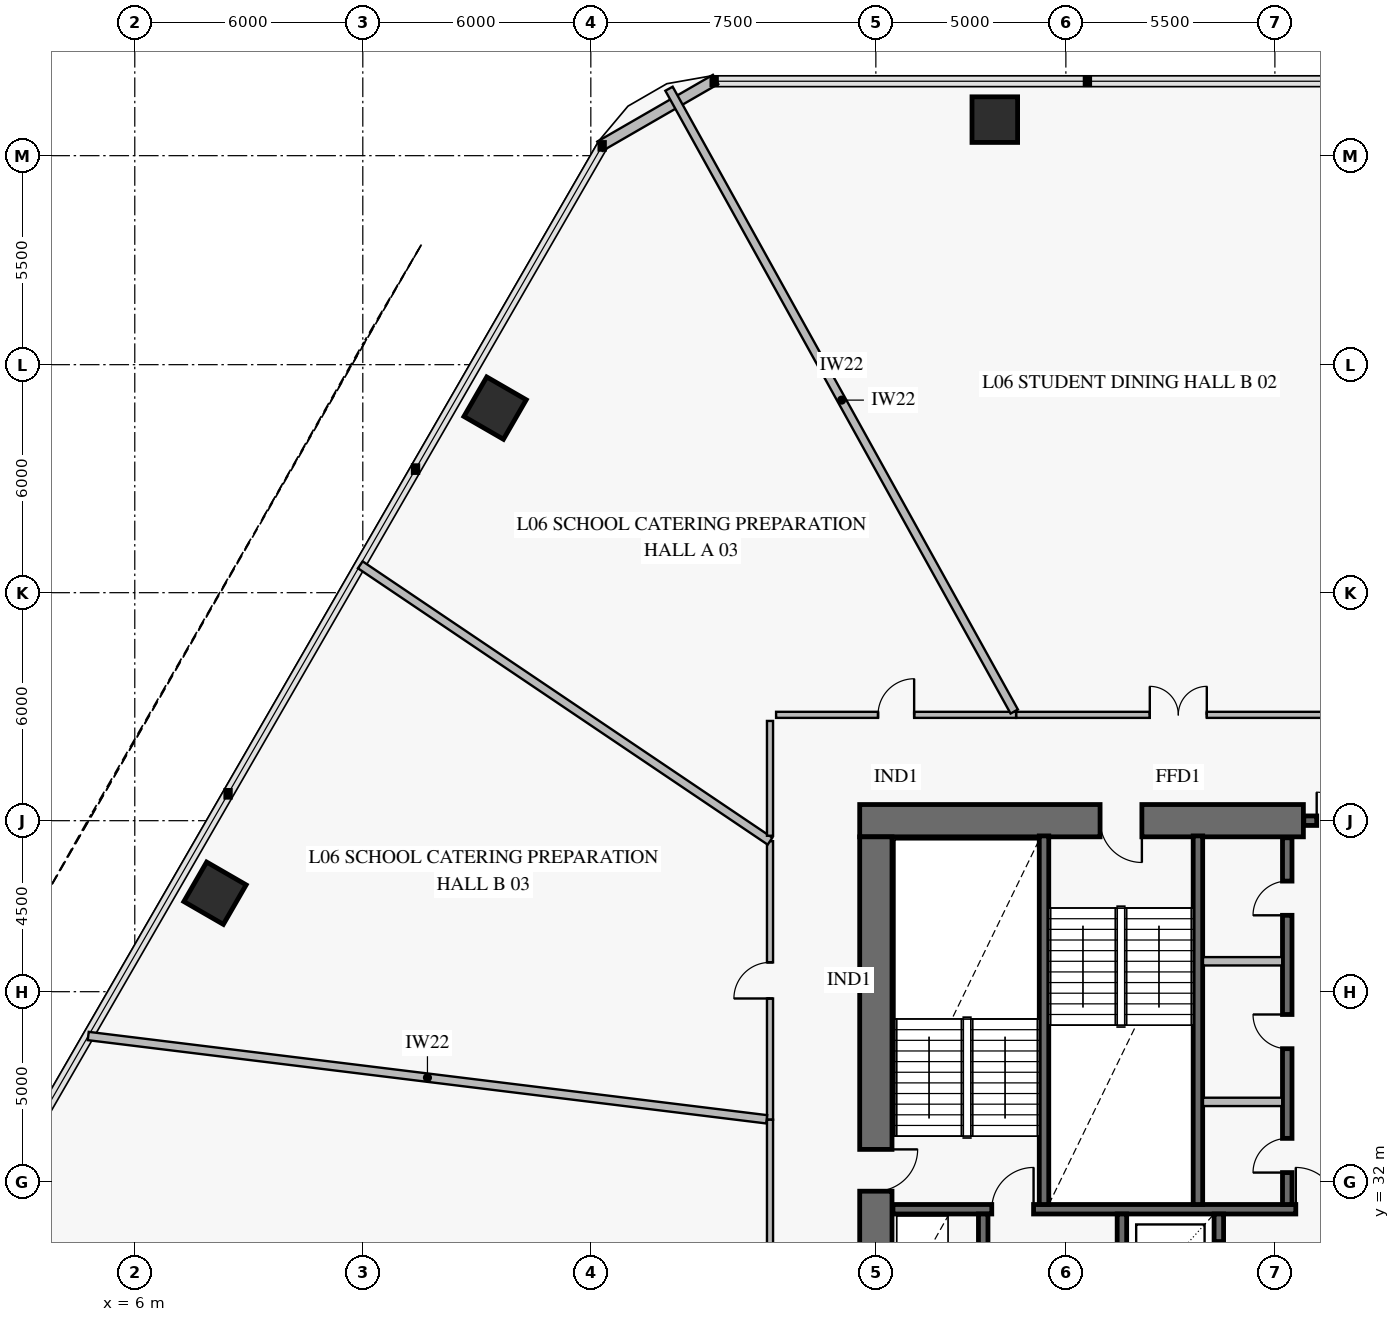
"""IFC4 building model, lengths in metres.
Left out: names, types, materials, properties, quantities, classifications, styles, units other than length and angle.
Written with IfcOpenShell. Run it as: python <this file> out.ifc"""

import sys

from ifc_helpers import new_model, si_unit, direction, frame, frame_2d, origin, origin_2d, place, context, subcontext, project, spatial, rectangle, extrude, element, fill, save


model = new_model("IFC4")
c1 = context("Model", 3, precision=1e-05, world=origin(), true_north=direction((0.0, 1.0)))
c2 = subcontext(c1, "Body", "Model", "MODEL_VIEW")
j1 = project(units=[si_unit("LENGTHUNIT", "METRE"), si_unit("PLANEANGLEUNIT", "RADIAN")], contexts=[c1])
p1 = place(None, origin())
s1 = spatial("IfcSite", under=j1, at=p1, CompositionType="ELEMENT")
p2 = place(p1, origin())
s2 = spatial("IfcBuilding", under=s1, at=p2, CompositionType="ELEMENT")
p3 = place(p2, frame((0.0, 0.0, 24.6)))
s3 = spatial("IfcBuildingStorey", under=s2, at=p3, CompositionType="ELEMENT", Elevation=24.6)
p4 = place(p3, frame((36.75, 41.5, 0.0), z_axis=(0.0, 0.0, 1.0), x_axis=(-1.0, 0.0, 0.0)))
e1 = element("IfcWall", 1, at=p4, inside=s3, PredefinedType="SHEAR", context=c2, shape_type="SweptSolid", body=[
    extrude(rectangle(XDim=11.675, YDim=0.85, at=frame_2d((5.837, 0.0))), origin(), (0.0, 0.0, 1.0), 4.2),
])
p5 = place(p4, frame((4.25, 0.0, 0.0)))
e2 = element("IfcOpeningElement", 2, at=p5, cuts=e1, PredefinedType="OPENING", context=c2, shape_type="SweptSolid", body=[
    extrude(rectangle(XDim=1.1, YDim=2.15, at=frame_2d((0.55, 1.075))), frame((0.0, 0.437, 0.0), z_axis=(0.0, -1.0, 0.0), x_axis=(1.0, 0.0, 0.0)), (0.0, 0.0, 1.0), 0.874),
])
p6 = place(p3, frame((25.5, 22.925, 0.0), z_axis=(0.0, 0.0, 1.0), x_axis=(0.0, 1.0, 0.0)))
e3 = element("IfcWall", 3, at=p6, inside=s3, PredefinedType="SHEAR", context=c2, shape_type="SweptSolid", body=[
    extrude(rectangle(XDim=18.15, YDim=0.85, at=frame_2d((9.075, 0.0))), origin(), (0.0, 0.0, 1.0), 4.2),
])
p7 = place(p6, frame((8.825, 0.0, 0.0)))
e4 = element("IfcOpeningElement", 4, at=p7, cuts=e3, PredefinedType="OPENING", context=c2, shape_type="SweptSolid", body=[
    extrude(rectangle(XDim=1.1, YDim=2.15, at=frame_2d((0.55, 1.075))), frame((0.0, 0.437, 0.0), z_axis=(0.0, -1.0, 0.0), x_axis=(1.0, 0.0, 0.0)), (0.0, 0.0, 1.0), 0.874),
])
for number, where, z_axis, x_axis in (
    (5, (28.63, 59.948, 0.0), (0.0, 0.0, 1.0), (-1.0, 0.0, 0.0)),
    (6, (15.481, 52.357, 0.0), (0.0, 0.0, 1.0), (-0.5, -0.866, 0.0)),
    (7, (8.111, 39.592, 0.0), (0.0, 0.0, 1.0), (-0.5, -0.866, 0.0)),
):
    element("IfcColumn", number, at=place(p3, frame(where, z_axis=z_axis, x_axis=x_axis)), inside=s3, PredefinedType="COLUMN", context=c2, shape_type="SweptSolid", body=[
        extrude(rectangle(XDim=1.2, YDim=1.2, at=origin_2d()), origin(), (0.0, 0.0, 1.0), 3.92),
    ])
p8 = place(p3, frame((18.239, 59.249, 0.0), z_axis=(0.0, 0.0, 1.0), x_axis=(0.866007452331, 0.500031091541, 0.0)))
e8 = element("IfcWall", 8, at=p8, inside=s3, PredefinedType="SOLIDWALL", context=c2, shape_type="SweptSolid", body=[
    extrude(rectangle(XDim=3.515, YDim=0.28, at=frame_2d((1.757, 0.0))), origin(), (0.0, 0.0, 1.0), 3.92),
])
p9 = place(p3, frame((36.76, 41.5, 0.0), z_axis=(0.0, 0.0, 1.0), x_axis=(1.0, 0.0, 0.0)))
e9 = element("IfcWall", 9, at=p9, inside=s3, PredefinedType="SOLIDWALL", context=c2, shape_type="SweptSolid", body=[
    extrude(rectangle(XDim=2.18, YDim=0.25, at=frame_2d((1.09, 0.0))), origin(), (0.0, 0.0, 1.0), 4.2),
])
p10 = place(p9, frame((0.34, 0.0, 0.0)))
e10 = element("IfcOpeningElement", 10, at=p10, cuts=e9, PredefinedType="OPENING", context=c2, shape_type="SweptSolid", body=[
    extrude(rectangle(XDim=1.5, YDim=2.15, at=frame_2d((0.75, 1.075))), frame((0.0, 0.137, 0.0), z_axis=(0.0, -1.0, 0.0), x_axis=(1.0, 0.0, 0.0)), (0.0, 0.0, 1.0), 0.274),
])
p11 = place(p3, frame((25.95, 31.275, 0.0), z_axis=(0.0, 0.0, 1.0), x_axis=(1.0, 0.0, 0.0)))
e11 = element("IfcWall", 11, at=p11, inside=s3, PredefinedType="SOLIDWALL", context=c2, shape_type="SweptSolid", body=[
    extrude(rectangle(XDim=20.1, YDim=0.25, at=frame_2d((10.05, 0.0))), origin(), (0.0, 0.0, 1.0), 4.2),
])
p12 = place(p11, frame((2.6, 0.0, 0.0)))
e12 = element("IfcOpeningElement", 12, at=p12, cuts=e11, PredefinedType="OPENING", context=c2, shape_type="SweptSolid", body=[
    extrude(rectangle(XDim=1.1, YDim=2.15, at=frame_2d((0.55, 1.075))), frame((0.0, 0.137, 0.0), z_axis=(0.0, -1.0, 0.0), x_axis=(1.0, 0.0, 0.0)), (0.0, 0.0, 1.0), 0.274),
])
p13 = place(p11, frame((10.6, 0.0, 0.0)))
e13 = element("IfcOpeningElement", 13, at=p13, cuts=e11, PredefinedType="OPENING", context=c2, shape_type="SweptSolid", body=[
    extrude(rectangle(XDim=1.1, YDim=2.15, at=frame_2d((0.55, 1.075))), frame((0.0, 0.137, 0.0), z_axis=(0.0, -1.0, 0.0), x_axis=(1.0, 0.0, 0.0)), (0.0, 0.0, 1.0), 0.274),
])
p14 = place(p11, frame((16.35, 0.0, 0.0)))
e14 = element("IfcOpeningElement", 14, at=p14, cuts=e11, PredefinedType="OPENING", context=c2, shape_type="SweptSolid", body=[
    extrude(rectangle(XDim=1.1, YDim=2.15, at=frame_2d((0.55, 1.075))), frame((0.0, 0.137, 0.0), z_axis=(0.0, -1.0, 0.0), x_axis=(1.0, 0.0, 0.0)), (0.0, 0.0, 1.0), 0.274),
])
for number, where, z_axis, x_axis in (
    (15, (29.925, 31.4, 0.0), (0.0, 0.0, 1.0), (0.0, 1.0, 0.0)),
    (16, (33.975, 31.4, 0.0), (0.0, 0.0, 1.0), (0.0, 1.0, 0.0)),
):
    element("IfcWall", number, at=place(p3, frame(where, z_axis=z_axis, x_axis=x_axis)), inside=s3, PredefinedType="SOLIDWALL", context=c2, shape_type="SweptSolid", body=[
        extrude(rectangle(XDim=9.7, YDim=0.25, at=frame_2d((4.85, 0.0))), origin(), (0.0, 0.0, 1.0), 4.2),
    ])
p15 = place(p3, frame((36.325, 31.4, 0.0), z_axis=(0.0, 0.0, 1.0), x_axis=(0.0, 1.0, 0.0)))
e17 = element("IfcWall", 17, at=p15, inside=s3, PredefinedType="SOLIDWALL", context=c2, shape_type="SweptSolid", body=[
    extrude(rectangle(XDim=9.65, YDim=0.25, at=frame_2d((4.825, 0.0))), origin(), (0.0, 0.0, 1.0), 4.2),
])
p16 = place(p15, frame((0.84, 0.0, 0.0)))
e18 = element("IfcOpeningElement", 18, at=p16, cuts=e17, PredefinedType="OPENING", context=c2, shape_type="SweptSolid", body=[
    extrude(rectangle(XDim=0.9, YDim=2.1, at=frame_2d((0.45, 1.05))), frame((0.0, 0.137, 0.0), z_axis=(0.0, -1.0, 0.0), x_axis=(1.0, 0.0, 0.0)), (0.0, 0.0, 1.0), 0.274),
])
p17 = place(p15, frame((4.1, 0.0, 0.0)))
e19 = element("IfcOpeningElement", 19, at=p17, cuts=e17, PredefinedType="OPENING", context=c2, shape_type="SweptSolid", body=[
    extrude(rectangle(XDim=0.9, YDim=2.1, at=frame_2d((0.45, 1.05))), frame((0.0, 0.137, 0.0), z_axis=(0.0, -1.0, 0.0), x_axis=(1.0, 0.0, 0.0)), (0.0, 0.0, 1.0), 0.274),
])
p18 = place(p15, frame((7.61, 0.0, 0.0)))
e20 = element("IfcOpeningElement", 20, at=p18, cuts=e17, PredefinedType="OPENING", context=c2, shape_type="SweptSolid", body=[
    extrude(rectangle(XDim=0.9, YDim=2.1, at=frame_2d((0.45, 1.05))), frame((0.0, 0.137, 0.0), z_axis=(0.0, -1.0, 0.0), x_axis=(1.0, 0.0, 0.0)), (0.0, 0.0, 1.0), 0.274),
])
p19 = place(p3, frame((28.325, 22.95, 0.0), z_axis=(0.0, 0.0, 1.0), x_axis=(0.0, 1.0, 0.0)))
e21 = element("IfcWall", 21, at=p19, inside=s3, PredefinedType="SOLIDWALL", context=c2, shape_type="SweptSolid", body=[
    extrude(rectangle(XDim=8.2, YDim=0.25, at=frame_2d((4.1, 0.0))), origin(), (0.0, 0.0, 1.0), 4.2),
])
p20 = place(p19, frame((0.75, 0.0, 0.0)))
e22 = element("IfcOpeningElement", 22, at=p20, cuts=e21, PredefinedType="OPENING", context=c2, shape_type="SweptSolid", body=[
    extrude(rectangle(XDim=1.3, YDim=2.3, at=frame_2d((0.65, 1.15))), frame((0.0, 0.137, 0.0), z_axis=(0.0, -1.0, 0.0), x_axis=(1.0, 0.0, 0.0)), (0.0, 0.0, 1.0), 0.274),
])
p21 = place(p19, frame((3.78, 0.0, 0.0)))
e23 = element("IfcOpeningElement", 23, at=p21, cuts=e21, PredefinedType="OPENING", context=c2, shape_type="SweptSolid", body=[
    extrude(rectangle(XDim=0.9, YDim=2.1, at=frame_2d((0.45, 1.05))), frame((0.0, 0.137, 0.0), z_axis=(0.0, -1.0, 0.0), x_axis=(1.0, 0.0, 0.0)), (0.0, 0.0, 1.0), 0.274),
])
p22 = place(p19, frame((6.5, 0.0, 0.0)))
e24 = element("IfcOpeningElement", 24, at=p22, cuts=e21, PredefinedType="OPENING", context=c2, shape_type="SweptSolid", body=[
    extrude(rectangle(XDim=0.9, YDim=2.1, at=frame_2d((0.45, 1.05))), frame((0.0, 0.137, 0.0), z_axis=(0.0, -1.0, 0.0), x_axis=(1.0, 0.0, 0.0)), (0.0, 0.0, 1.0), 0.274),
])
p23 = place(p3, frame((31.975, 22.95, 0.0), z_axis=(0.0, 0.0, 1.0), x_axis=(0.0, 1.0, 0.0)))
e25 = element("IfcWall", 25, at=p23, inside=s3, PredefinedType="SOLIDWALL", context=c2, shape_type="SweptSolid", body=[
    extrude(rectangle(XDim=8.2, YDim=0.25, at=frame_2d((4.1, 0.0))), origin(), (0.0, 0.0, 1.0), 4.2),
])
p24 = place(p3, frame((34.525, 22.95, 0.0), z_axis=(0.0, 0.0, 1.0), x_axis=(0.0, 1.0, 0.0)))
e26 = element("IfcWall", 26, at=p24, inside=s3, PredefinedType="SOLIDWALL", context=c2, shape_type="SweptSolid", body=[
    extrude(rectangle(XDim=8.2, YDim=0.25, at=frame_2d((4.1, 0.0))), origin(), (0.0, 0.0, 1.0), 4.2),
])
p25 = place(p24, frame((0.775, 0.0, 0.0)))
e27 = element("IfcOpeningElement", 27, at=p25, cuts=e26, PredefinedType="OPENING", context=c2, shape_type="SweptSolid", body=[
    extrude(rectangle(XDim=1.1, YDim=2.2, at=frame_2d((0.55, 1.1))), frame((0.0, 0.137, 0.0), z_axis=(0.0, -1.0, 0.0), x_axis=(1.0, 0.0, 0.0)), (0.0, 0.0, 1.0), 0.274),
])
p26 = place(p24, frame((3.575, 0.0, 0.0)))
e28 = element("IfcOpeningElement", 28, at=p26, cuts=e26, PredefinedType="OPENING", context=c2, shape_type="SweptSolid", body=[
    extrude(rectangle(XDim=1.1, YDim=2.2, at=frame_2d((0.55, 1.1))), frame((0.0, 0.137, 0.0), z_axis=(0.0, -1.0, 0.0), x_axis=(1.0, 0.0, 0.0)), (0.0, 0.0, 1.0), 0.274),
])
p27 = place(p24, frame((6.375, 0.0, 0.0)))
e29 = element("IfcOpeningElement", 29, at=p27, cuts=e26, PredefinedType="OPENING", context=c2, shape_type="SweptSolid", body=[
    extrude(rectangle(XDim=1.1, YDim=2.2, at=frame_2d((0.55, 1.1))), frame((0.0, 0.137, 0.0), z_axis=(0.0, -1.0, 0.0), x_axis=(1.0, 0.0, 0.0)), (0.0, 0.0, 1.0), 0.274),
])
p28 = place(p3, frame((37.727, 44.285, 0.0), z_axis=(0.0, 0.0, 1.0), x_axis=(-1.0, 0.0, 0.0)))
e30 = element("IfcWall", 30, at=p28, inside=s3, PredefinedType="PARTITIONING", context=c2, shape_type="SweptSolid", body=[
    extrude(rectangle(XDim=8.536, YDim=0.16, at=frame_2d((4.268, 0.0))), origin(), (0.0, 0.0, 1.0), 3.22),
])
p29 = place(p28, frame((3.518, 0.0, 0.0)))
e31 = element("IfcOpeningElement", 31, at=p29, cuts=e30, PredefinedType="OPENING", context=c2, shape_type="SweptSolid", body=[
    extrude(rectangle(XDim=1.5, YDim=2.15, at=frame_2d((0.75, 1.075))), frame((0.0, 0.092, 0.0), z_axis=(0.0, -1.0, 0.0), x_axis=(1.0, 0.0, 0.0)), (0.0, 0.0, 1.0), 0.184),
])
p30 = place(p3, frame((29.19, 44.285, 0.0), z_axis=(0.0, 0.0, 1.0), x_axis=(-1.0, 0.0, 0.0)))
e32 = element("IfcWall", 32, at=p30, inside=s3, PredefinedType="PARTITIONING", context=c2, shape_type="SweptSolid", body=[
    extrude(rectangle(XDim=6.315, YDim=0.16, at=frame_2d((3.158, 0.0))), origin(), (0.0, 0.0, 1.0), 3.22),
])
p31 = place(p30, frame((2.683, 0.0, 0.0)))
e33 = element("IfcOpeningElement", 33, at=p31, cuts=e32, PredefinedType="OPENING", context=c2, shape_type="SweptSolid", body=[
    extrude(rectangle(XDim=0.95, YDim=2.1, at=frame_2d((0.475, 1.05))), frame((0.0, 0.092, 0.0), z_axis=(0.0, -1.0, 0.0), x_axis=(1.0, 0.0, 0.0)), (0.0, 0.0, 1.0), 0.184),
])
p32 = place(p3, frame((22.715, 40.961, 0.0), z_axis=(0.0, 0.0, 1.0), x_axis=(0.0, -1.0, 0.0)))
e34 = element("IfcWall", 34, at=p32, inside=s3, PredefinedType="PARTITIONING", context=c2, shape_type="SweptSolid", body=[
    extrude(rectangle(XDim=7.33, YDim=0.16, at=frame_2d((3.665, 0.0))), origin(), (0.0, 0.0, 1.0), 3.22),
])
p33 = place(p32, frame((3.19, 0.0, 0.0)))
e35 = element("IfcOpeningElement", 35, at=p33, cuts=e34, PredefinedType="OPENING", context=c2, shape_type="SweptSolid", body=[
    extrude(rectangle(XDim=0.95, YDim=2.1, at=frame_2d((0.475, 1.05))), frame((0.0, 0.092, 0.0), z_axis=(0.0, -1.0, 0.0), x_axis=(1.0, 0.0, 0.0)), (0.0, 0.0, 1.0), 0.184),
])
p34 = place(p3, frame((22.715, 33.631, 0.0), z_axis=(0.0, 0.0, 1.0), x_axis=(0.0, -1.0, 0.0)))
e36 = element("IfcWall", 36, at=p34, inside=s3, PredefinedType="PARTITIONING", context=c2, shape_type="SweptSolid", body=[
    extrude(rectangle(XDim=9.933, YDim=0.16, at=frame_2d((4.966, 0.0))), origin(), (0.0, 0.0, 1.0), 3.22),
])
p35 = place(p34, frame((4.216, 0.0, 0.0)))
e37 = element("IfcOpeningElement", 37, at=p35, cuts=e36, PredefinedType="OPENING", context=c2, shape_type="SweptSolid", body=[
    extrude(rectangle(XDim=1.5, YDim=2.15, at=frame_2d((0.75, 1.075))), frame((0.0, 0.092, 0.0), z_axis=(0.0, -1.0, 0.0), x_axis=(1.0, 0.0, 0.0)), (0.0, 0.0, 1.0), 0.184),
])
for number, where, z_axis, x_axis in (
    (38, (34.108, 34.1, 0.0), (0.0, 0.0, 1.0), (1.0, 0.0, 0.0)),
    (39, (34.108, 37.8, 0.0), (0.0, 0.0, 1.0), (1.0, 0.0, 0.0)),
):
    element("IfcWall", number, at=place(p3, frame(where, z_axis=z_axis, x_axis=x_axis)), inside=s3, PredefinedType="PARTITIONING", context=c2, shape_type="SweptSolid", body=[
        extrude(rectangle(XDim=2.084, YDim=0.22, at=frame_2d((1.042, 0.0))), origin(), (0.0, 0.0, 1.0), 3.92),
    ])
p36 = place(p3, frame((29.142, 44.373, 0.0), z_axis=(0.0, 0.0, 1.0), x_axis=(-0.484814111505, 0.874617217579, 0.0)))
e40 = element("IfcWall", 40, at=p36, inside=s3, PredefinedType="PARTITIONING", context=c2, shape_type="SweptSolid", body=[
    extrude(rectangle(XDim=18.738, YDim=0.22, at=frame_2d((9.369, 0.0))), origin(), (0.0, 0.0, 1.0), 3.17),
])
p37 = place(p3, frame((22.715, 40.961, 0.0), z_axis=(0.0, 0.0, 1.0), x_axis=(-0.829037316792, 0.559193282654, 0.0)))
e41 = element("IfcWall", 41, at=p37, inside=s3, PredefinedType="PARTITIONING", context=c2, shape_type="SweptSolid", body=[
    extrude(rectangle(XDim=13.005, YDim=0.22, at=frame_2d((6.502, 0.0))), origin(), (0.0, 0.0, 1.0), 3.17),
])
p38 = place(p3, frame((22.715, 44.125, 0.0), z_axis=(0.0, 0.0, 1.0), x_axis=(0.0, -1.0, 0.0)))
e42 = element("IfcWall", 42, at=p38, inside=s3, PredefinedType="PARTITIONING", context=c2, shape_type="SweptSolid", body=[
    extrude(rectangle(XDim=3.022, YDim=0.16, at=frame_2d((1.511, 0.0))), origin(), (0.0, 0.0, 1.0), 3.92),
])
p39 = place(p3, frame((22.627, 33.642, 0.0), z_axis=(0.0, 0.0, 1.0), x_axis=(-0.99254636489, 0.121867606624, 0.0)))
e43 = element("IfcWall", 43, at=p39, inside=s3, PredefinedType="PARTITIONING", context=c2, shape_type="SweptSolid", body=[
    extrude(rectangle(XDim=17.986, YDim=0.22, at=frame_2d((8.993, 0.0))), origin(), (0.0, 0.0, 1.0), 3.17),
])
p40 = place(p7, frame((1.1, 0.0, 0.0), z_axis=(0.0, 0.0, 1.0), x_axis=(-1.0, 0.0, 0.0)))
e44 = element("IfcDoor", 44, at=p40, inside=s3, OperationType="SINGLE_SWING_LEFT", PredefinedType="USERDEFINED", context=c2, shape_type="SweptSolid", body=[
    extrude(rectangle(XDim=1.1, YDim=2.15, at=frame_2d((0.55, 1.075))), frame((0.0, 0.025, 0.0), z_axis=(0.0, -1.0, 0.0), x_axis=(1.0, 0.0, 0.0)), (0.0, 0.0, 1.0), 0.05),
])
fill(e4, e44)
p41 = place(p5, origin())
e45 = element("IfcDoor", 45, at=p41, inside=s3, OperationType="SINGLE_SWING_LEFT", PredefinedType="USERDEFINED", context=c2, shape_type="SweptSolid", body=[
    extrude(rectangle(XDim=1.1, YDim=2.15, at=frame_2d((0.55, 1.075))), frame((0.0, 0.025, 0.0), z_axis=(0.0, -1.0, 0.0), x_axis=(1.0, 0.0, 0.0)), (0.0, 0.0, 1.0), 0.05),
])
fill(e2, e45)
p42 = place(p10, origin())
e46 = element("IfcDoor", 46, at=p42, inside=s3, OperationType="DOUBLE_DOOR_SINGLE_SWING", PredefinedType="DOOR", context=c2, shape_type="SweptSolid", body=[
    extrude(rectangle(XDim=1.5, YDim=2.15, at=frame_2d((0.75, 1.075))), frame((0.0, 0.025, 0.0), z_axis=(0.0, -1.0, 0.0), x_axis=(1.0, 0.0, 0.0)), (0.0, 0.0, 1.0), 0.05),
])
fill(e10, e46)
p43 = place(p12, origin())
e47 = element("IfcDoor", 47, at=p43, inside=s3, OperationType="SINGLE_SWING_RIGHT", PredefinedType="USERDEFINED", context=c2, shape_type="SweptSolid", body=[
    extrude(rectangle(XDim=1.1, YDim=2.15, at=frame_2d((0.55, 1.075))), frame((0.0, 0.025, 0.0), z_axis=(0.0, -1.0, 0.0), x_axis=(1.0, 0.0, 0.0)), (0.0, 0.0, 1.0), 0.05),
])
fill(e12, e47)
p44 = place(p13, origin())
e48 = element("IfcDoor", 48, at=p44, inside=s3, OperationType="SINGLE_SWING_LEFT", PredefinedType="USERDEFINED", context=c2, shape_type="SweptSolid", body=[
    extrude(rectangle(XDim=1.1, YDim=2.15, at=frame_2d((0.55, 1.075))), frame((0.0, 0.025, 0.0), z_axis=(0.0, -1.0, 0.0), x_axis=(1.0, 0.0, 0.0)), (0.0, 0.0, 1.0), 0.05),
])
fill(e13, e48)
p45 = place(p16, origin())
e49 = element("IfcDoor", 49, at=p45, inside=s3, OperationType="SINGLE_SWING_LEFT", PredefinedType="DOOR", context=c2, shape_type="SweptSolid", body=[
    extrude(rectangle(XDim=0.9, YDim=2.1, at=frame_2d((0.45, 1.05))), frame((0.0, 0.025, 0.0), z_axis=(0.0, -1.0, 0.0), x_axis=(1.0, 0.0, 0.0)), (0.0, 0.0, 1.0), 0.05),
])
fill(e18, e49)
p46 = place(p17, origin())
e50 = element("IfcDoor", 50, at=p46, inside=s3, OperationType="SINGLE_SWING_RIGHT", PredefinedType="DOOR", context=c2, shape_type="SweptSolid", body=[
    extrude(rectangle(XDim=0.9, YDim=2.1, at=frame_2d((0.45, 1.05))), frame((0.0, 0.025, 0.0), z_axis=(0.0, -1.0, 0.0), x_axis=(1.0, 0.0, 0.0)), (0.0, 0.0, 1.0), 0.05),
])
fill(e19, e50)
p47 = place(p18, origin())
e51 = element("IfcDoor", 51, at=p47, inside=s3, OperationType="SINGLE_SWING_LEFT", PredefinedType="DOOR", context=c2, shape_type="SweptSolid", body=[
    extrude(rectangle(XDim=0.9, YDim=2.1, at=frame_2d((0.45, 1.05))), frame((0.0, 0.025, 0.0), z_axis=(0.0, -1.0, 0.0), x_axis=(1.0, 0.0, 0.0)), (0.0, 0.0, 1.0), 0.05),
])
fill(e20, e51)
p48 = place(p27, frame((1.1, 0.0, 0.0), z_axis=(0.0, 0.0, 1.0), x_axis=(-1.0, 0.0, 0.0)))
e52 = element("IfcDoor", 52, at=p48, inside=s3, OperationType="DOUBLE_DOOR_SLIDING", PredefinedType="DOOR", context=c2, shape_type="SweptSolid", body=[
    extrude(rectangle(XDim=1.1, YDim=2.2, at=frame_2d((0.55, 1.1))), frame((0.0, 0.025, 0.0), z_axis=(0.0, -1.0, 0.0), x_axis=(1.0, 0.0, 0.0)), (0.0, 0.0, 1.0), 0.05),
])
fill(e29, e52)
p49 = place(p29, frame((1.5, 0.0, 0.0), z_axis=(0.0, 0.0, 1.0), x_axis=(-1.0, 0.0, 0.0)))
e53 = element("IfcDoor", 53, at=p49, inside=s3, OperationType="DOUBLE_DOOR_SINGLE_SWING", PredefinedType="DOOR", context=c2, shape_type="SweptSolid", body=[
    extrude(rectangle(XDim=1.5, YDim=2.15, at=frame_2d((0.75, 1.075))), frame((0.0, 0.025, 0.0), z_axis=(0.0, -1.0, 0.0), x_axis=(1.0, 0.0, 0.0)), (0.0, 0.0, 1.0), 0.05),
])
fill(e31, e53)
p50 = place(p31, frame((0.95, 0.0, 0.0), z_axis=(0.0, 0.0, 1.0), x_axis=(-1.0, 0.0, 0.0)))
e54 = element("IfcDoor", 54, at=p50, inside=s3, OperationType="SINGLE_SWING_RIGHT", PredefinedType="DOOR", context=c2, shape_type="SweptSolid", body=[
    extrude(rectangle(XDim=0.95, YDim=2.1, at=frame_2d((0.475, 1.05))), frame((0.0, 0.025, 0.0), z_axis=(0.0, -1.0, 0.0), x_axis=(1.0, 0.0, 0.0)), (0.0, 0.0, 1.0), 0.05),
])
fill(e33, e54)
p51 = place(p33, frame((0.95, 0.0, 0.0), z_axis=(0.0, 0.0, 1.0), x_axis=(-1.0, 0.0, 0.0)))
e55 = element("IfcDoor", 55, at=p51, inside=s3, OperationType="SINGLE_SWING_LEFT", PredefinedType="DOOR", context=c2, shape_type="SweptSolid", body=[
    extrude(rectangle(XDim=0.95, YDim=2.1, at=frame_2d((0.475, 1.05))), frame((0.0, 0.025, 0.0), z_axis=(0.0, -1.0, 0.0), x_axis=(1.0, 0.0, 0.0)), (0.0, 0.0, 1.0), 0.05),
])
fill(e35, e55)
save(model, sys.argv[1])
